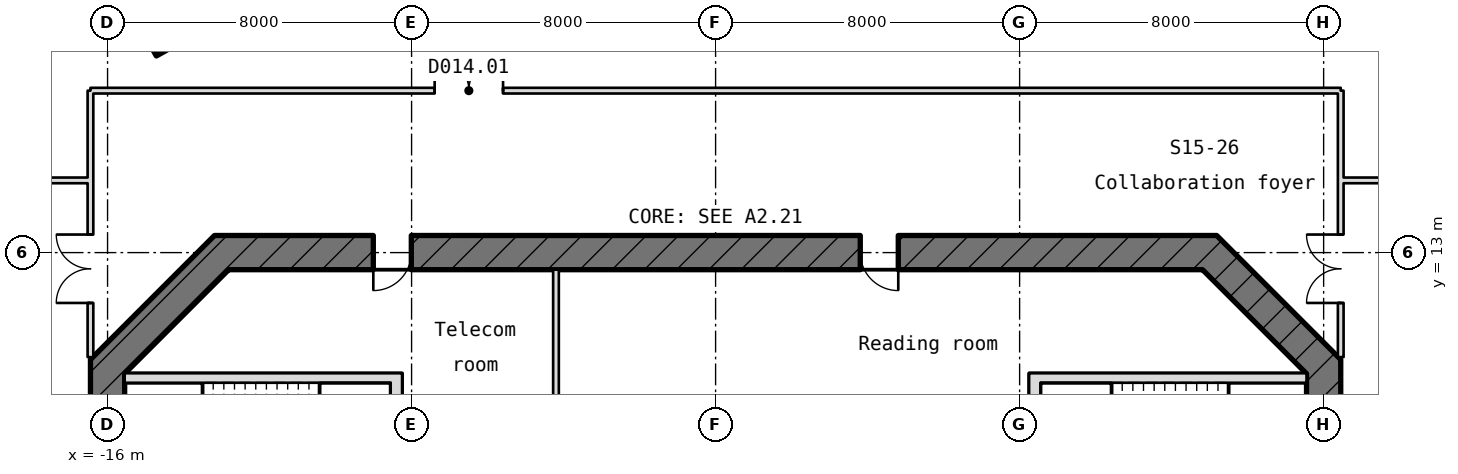
"""IFC4 building model, lengths in metres.
Left out: names, types, materials, properties, quantities, classifications, styles, units other than length and angle.
Written with IfcOpenShell. Run it as: python <this file> out.ifc"""

import sys

from ifc_helpers import new_model, si_unit, direction, frame, frame_2d, origin, origin_2d, place, context, subcontext, project, spatial, rectangle, hollow_rectangle, extrude, element, fill, save


model = new_model("IFC4")
c1 = context("Model", 3, precision=1e-05, world=origin(), true_north=direction((0.0, 1.0)))
c2 = subcontext(c1, "Body", "Model", "MODEL_VIEW")
j1 = project(units=[si_unit("LENGTHUNIT", "METRE"), si_unit("PLANEANGLEUNIT", "RADIAN")], contexts=[c1])
p1 = place(None, origin())
s1 = spatial("IfcSite", under=j1, at=p1, CompositionType="ELEMENT")
p2 = place(p1, origin())
s2 = spatial("IfcBuilding", under=s1, at=p2, CompositionType="ELEMENT")
p3 = place(p2, frame((0.0, 0.0, 223.3)))
s3 = spatial("IfcBuildingStorey", under=s2, at=p3, CompositionType="ELEMENT", Elevation=223.3)
for number, where, z_axis, x_axis in (
    (1, (17.971, 19.509, -0.18), (0.0, 0.0, 1.0), (0.874, -0.485, 0.0)),
    (2, (-14.372, 19.509, -0.18), (0.0, 0.0, 1.0), (0.874, 0.485, 0.0)),
):
    element("IfcColumn", number, at=place(p3, frame(where, z_axis=z_axis, x_axis=x_axis)), inside=s3, PredefinedType="COLUMN", context=c2, shape_type="SweptSolid", body=[
        extrude(hollow_rectangle(XDim=1.9, YDim=2.0, WallThickness=0.07, at=origin_2d()), origin(), (0.0, 0.0, 1.0), 4.15),
    ])
p4 = place(p3, frame((-15.249, 20.823, 0.0), z_axis=(0.0, 0.0, 1.0), x_axis=(-0.765870158107, -0.642995257308, 0.0)))
e3 = element("IfcWall", 3, at=p4, inside=s3, PredefinedType="SOLIDWALL", context=c2, shape_type="SweptSolid", body=[
    extrude(rectangle(XDim=11.055, YDim=0.3, at=frame_2d((5.528, 0.0))), origin(), (0.0, 0.0, 1.0), 3.97),
])
p5 = place(p4, frame((7.355, 0.0, 0.0)))
e4 = element("IfcOpeningElement", 4, at=p5, cuts=e3, PredefinedType="OPENING", context=c2, shape_type="SweptSolid", body=[
    extrude(rectangle(XDim=1.8, YDim=2.4, at=frame_2d((0.9, 1.2))), frame((0.0, 0.16, 0.0), z_axis=(0.0, -1.0, 0.0), x_axis=(1.0, 0.0, 0.0)), (0.0, 0.0, 1.0), 0.32),
])
p6 = place(p4, frame((4.755, 0.0, 0.9)))
e5 = element("IfcOpeningElement", 5, at=p6, cuts=e3, PredefinedType="OPENING", context=c2, shape_type="SweptSolid", body=[
    extrude(rectangle(XDim=2.0, YDim=1.5, at=frame_2d((1.0, 0.75))), frame((0.0, 0.16, 0.0), z_axis=(0.0, -1.0, 0.0), x_axis=(1.0, 0.0, 0.0)), (0.0, 0.0, 1.0), 0.32),
])
p7 = place(p3, frame((16.0, -10.186, -0.18), z_axis=(0.0, 0.0, 1.0), x_axis=(0.0, 1.0, 0.0)))
e6 = element("IfcWall", 6, at=p7, inside=s3, PredefinedType="SHEAR", context=c2, shape_type="SweptSolid", body=[
    extrude(rectangle(XDim=20.373, YDim=0.9, at=frame_2d((10.186, 0.0))), origin(), (0.0, 0.0, 1.0), 4.15),
])
p8 = place(p7, frame((8.986, 0.0, 0.18)))
e7 = element("IfcOpeningElement", 7, at=p8, cuts=e6, PredefinedType="OPENING", context=c2, shape_type="SweptSolid", body=[
    extrude(rectangle(XDim=2.4, YDim=2.1, at=frame_2d((1.2, 1.05))), frame((0.0, 0.46, 0.0), z_axis=(0.0, -1.0, 0.0), x_axis=(1.0, 0.0, 0.0)), (0.0, 0.0, 1.0), 0.92),
])
p9 = place(p7, frame((13.586, 0.0, 0.18)))
e8 = element("IfcOpeningElement", 8, at=p9, cuts=e6, PredefinedType="OPENING", context=c2, shape_type="SweptSolid", body=[
    extrude(rectangle(XDim=1.2, YDim=2.1, at=frame_2d((0.6, 1.05))), frame((0.0, 0.46, 0.0), z_axis=(0.0, -1.0, 0.0), x_axis=(1.0, 0.0, 0.0)), (0.0, 0.0, 1.0), 0.92),
])
p10 = place(p7, frame((2.4, 0.0, 0.18)))
e9 = element("IfcOpeningElement", 9, at=p10, cuts=e6, PredefinedType="OPENING", context=c2, shape_type="SweptSolid", body=[
    extrude(rectangle(XDim=1.2, YDim=2.1, at=frame_2d((0.6, 1.05))), frame((0.0, 0.46, 0.0), z_axis=(0.0, -1.0, 0.0), x_axis=(1.0, 0.0, 0.0)), (0.0, 0.0, 1.0), 0.92),
])
p11 = place(p3, frame((16.132, 9.868, -0.18), z_axis=(0.0, 0.0, 1.0), x_axis=(-0.707106781187, 0.707106781187, 0.0)))
e10 = element("IfcWall", 10, at=p11, inside=s3, PredefinedType="SHEAR", context=c2, shape_type="SweptSolid", body=[
    extrude(rectangle(XDim=4.615, YDim=0.9, at=frame_2d((2.308, 0.0))), origin(), (0.0, 0.0, 1.0), 4.15),
])
p12 = place(p3, frame((13.186, 13.0, -0.18), z_axis=(0.0, 0.0, 1.0), x_axis=(-1.0, 0.0, 0.0)))
e11 = element("IfcWall", 11, at=p12, inside=s3, PredefinedType="SHEAR", context=c2, shape_type="SweptSolid", body=[
    extrude(rectangle(XDim=26.373, YDim=0.9, at=frame_2d((13.186, 0.0))), origin(), (0.0, 0.0, 1.0), 4.15),
])
p13 = place(p12, frame((21.193, 0.0, 0.18)))
e12 = element("IfcOpeningElement", 12, at=p13, cuts=e11, PredefinedType="OPENING", context=c2, shape_type="SweptSolid", body=[
    extrude(rectangle(XDim=1.0, YDim=2.1, at=frame_2d((0.5, 1.05))), frame((0.0, 0.46, 0.0), z_axis=(0.0, -1.0, 0.0), x_axis=(1.0, 0.0, 0.0)), (0.0, 0.0, 1.0), 0.92),
])
p14 = place(p12, frame((8.379, 0.0, 0.18)))
e13 = element("IfcOpeningElement", 13, at=p14, cuts=e11, PredefinedType="OPENING", context=c2, shape_type="SweptSolid", body=[
    extrude(rectangle(XDim=1.0, YDim=2.1, at=frame_2d((0.5, 1.05))), frame((0.0, 0.46, 0.0), z_axis=(0.0, -1.0, 0.0), x_axis=(1.0, 0.0, 0.0)), (0.0, 0.0, 1.0), 0.92),
])
p15 = place(p3, frame((-12.868, 13.132, -0.18), z_axis=(0.0, 0.0, 1.0), x_axis=(-0.707106781187, -0.707106781187, 0.0)))
e14 = element("IfcWall", 14, at=p15, inside=s3, PredefinedType="SHEAR", context=c2, shape_type="SweptSolid", body=[
    extrude(rectangle(XDim=4.615, YDim=0.9, at=frame_2d((2.308, 0.0))), origin(), (0.0, 0.0, 1.0), 4.15),
])
p16 = place(p3, frame((-16.0, 10.186, -0.18), z_axis=(0.0, 0.0, 1.0), x_axis=(0.0, -1.0, 0.0)))
e15 = element("IfcWall", 15, at=p16, inside=s3, PredefinedType="SHEAR", context=c2, shape_type="SweptSolid", body=[
    extrude(rectangle(XDim=20.373, YDim=0.9, at=frame_2d((10.186, 0.0))), origin(), (0.0, 0.0, 1.0), 4.15),
])
p17 = place(p16, frame((8.986, 0.0, 0.18)))
e16 = element("IfcOpeningElement", 16, at=p17, cuts=e15, PredefinedType="OPENING", context=c2, shape_type="SweptSolid", body=[
    extrude(rectangle(XDim=2.4, YDim=2.1, at=frame_2d((1.2, 1.05))), frame((0.0, 0.46, 0.0), z_axis=(0.0, -1.0, 0.0), x_axis=(1.0, 0.0, 0.0)), (0.0, 0.0, 1.0), 0.92),
])
p18 = place(p16, frame((5.586, 0.0, 0.18)))
e17 = element("IfcOpeningElement", 17, at=p18, cuts=e15, PredefinedType="OPENING", context=c2, shape_type="SweptSolid", body=[
    extrude(rectangle(XDim=1.2, YDim=2.1, at=frame_2d((0.6, 1.05))), frame((0.0, 0.46, 0.0), z_axis=(0.0, -1.0, 0.0), x_axis=(1.0, 0.0, 0.0)), (0.0, 0.0, 1.0), 0.92),
])
for number, where, z_axis, x_axis in (
    (18, (-15.55, 9.7, -0.18), (0.0, 0.0, 1.0), (1.0, 0.0, 0.0)),
    (19, (8.55, 9.7, -0.18), (0.0, 0.0, 1.0), (1.0, 0.0, 0.0)),
):
    element("IfcWall", number, at=place(p3, frame(where, z_axis=z_axis, x_axis=x_axis)), inside=s3, PredefinedType="SHEAR", context=c2, shape_type="SweptSolid", body=[
        extrude(rectangle(XDim=7.0, YDim=0.25, at=frame_2d((3.5, 0.0))), origin(), (0.0, 0.0, 1.0), 4.15),
    ])
p19 = place(p3, frame((-8.4, 8.35, -0.18), z_axis=(0.0, 0.0, 1.0), x_axis=(0.0, 1.0, 0.0)))
e20 = element("IfcWall", 20, at=p19, inside=s3, PredefinedType="SHEAR", context=c2, shape_type="SweptSolid", body=[
    extrude(rectangle(XDim=1.475, YDim=0.3, at=frame_2d((0.737, 0.0))), origin(), (0.0, 0.0, 1.0), 4.15),
])
p20 = place(p3, frame((-4.2, 8.46, 0.0), z_axis=(0.0, 0.0, 1.0), x_axis=(0.0, 1.0, 0.0)))
e21 = element("IfcWall", 21, at=p20, inside=s3, PredefinedType="PARTITIONING", context=c2, shape_type="SweptSolid", body=[
    extrude(rectangle(XDim=4.09, YDim=0.15, at=frame_2d((2.045, 0.0))), origin(), (0.0, 0.0, 1.0), 3.97),
])
p21 = place(p3, frame((8.4, 8.35, -0.18), z_axis=(0.0, 0.0, 1.0), x_axis=(0.0, 1.0, 0.0)))
e22 = element("IfcWall", 22, at=p21, inside=s3, PredefinedType="SHEAR", context=c2, shape_type="SweptSolid", body=[
    extrude(rectangle(XDim=1.475, YDim=0.3, at=frame_2d((0.737, 0.0))), origin(), (0.0, 0.0, 1.0), 4.15),
])
p22 = place(p3, frame((-19.15, 14.9, 0.0), z_axis=(0.0, 0.0, 1.0), x_axis=(1.0, 0.0, 0.0)))
e23 = element("IfcWall", 23, at=p22, inside=s3, PredefinedType="PARTITIONING", context=c2, shape_type="SweptSolid", body=[
    extrude(rectangle(XDim=2.7, YDim=0.15, at=frame_2d((1.35, 0.0))), origin(), (0.0, 0.0, 1.0), 3.97),
])
p23 = place(p3, frame((-16.45, 10.25, 0.0), z_axis=(0.0, 0.0, 1.0), x_axis=(0.0, 1.0, 0.0)))
e24 = element("IfcWall", 24, at=p23, inside=s3, PredefinedType="PARTITIONING", context=c2, shape_type="SweptSolid", body=[
    extrude(rectangle(XDim=7.011, YDim=0.15, at=frame_2d((3.505, 0.0))), origin(), (0.0, 0.0, 1.0), 3.97),
])
p24 = place(p23, frame((1.425, 0.0, 0.0)))
e25 = element("IfcOpeningElement", 25, at=p24, cuts=e24, PredefinedType="OPENING", context=c2, shape_type="SweptSolid", body=[
    extrude(rectangle(XDim=1.8, YDim=2.1, at=frame_2d((0.9, 1.05))), frame((0.0, 0.085, 0.0), z_axis=(0.0, -1.0, 0.0), x_axis=(1.0, 0.0, 0.0)), (0.0, 0.0, 1.0), 0.17),
])
p25 = place(p3, frame((-16.45, 17.261, 0.0), z_axis=(0.0, 0.0, 1.0), x_axis=(1.0, 0.0, 0.0)))
e26 = element("IfcWall", 26, at=p25, inside=s3, PredefinedType="PARTITIONING", context=c2, shape_type="SweptSolid", body=[
    extrude(rectangle(XDim=32.9, YDim=0.15, at=frame_2d((16.45, 0.0))), origin(), (0.0, 0.0, 1.0), 3.97),
])
p26 = place(p25, frame((9.057, 0.0, 0.0)))
e27 = element("IfcOpeningElement", 27, at=p26, cuts=e26, PredefinedType="OPENING", context=c2, shape_type="SweptSolid", body=[
    extrude(rectangle(XDim=1.8, YDim=2.1, at=frame_2d((0.9, 1.05))), frame((0.0, 0.085, 0.0), z_axis=(0.0, -1.0, 0.0), x_axis=(1.0, 0.0, 0.0)), (0.0, 0.0, 1.0), 0.17),
])
p27 = place(p3, frame((16.45, 10.25, 0.0), z_axis=(0.0, 0.0, 1.0), x_axis=(0.0, 1.0, 0.0)))
e28 = element("IfcWall", 28, at=p27, inside=s3, PredefinedType="PARTITIONING", context=c2, shape_type="SweptSolid", body=[
    extrude(rectangle(XDim=7.011, YDim=0.15, at=frame_2d((3.505, 0.0))), origin(), (0.0, 0.0, 1.0), 3.97),
])
p28 = place(p27, frame((1.425, 0.0, 0.0)))
e29 = element("IfcOpeningElement", 29, at=p28, cuts=e28, PredefinedType="OPENING", context=c2, shape_type="SweptSolid", body=[
    extrude(rectangle(XDim=1.8, YDim=2.1, at=frame_2d((0.9, 1.05))), frame((0.0, 0.085, 0.0), z_axis=(0.0, -1.0, 0.0), x_axis=(1.0, 0.0, 0.0)), (0.0, 0.0, 1.0), 0.17),
])
p29 = place(p3, frame((16.45, 14.9, 0.0), z_axis=(0.0, 0.0, 1.0), x_axis=(1.0, 0.0, 0.0)))
e30 = element("IfcWall", 30, at=p29, inside=s3, PredefinedType="PARTITIONING", context=c2, shape_type="SweptSolid", body=[
    extrude(rectangle(XDim=2.7, YDim=0.15, at=frame_2d((1.35, 0.0))), origin(), (0.0, 0.0, 1.0), 3.97),
])
p30 = place(p13, origin())
e31 = element("IfcDoor", 31, at=p30, inside=s3, OperationType="SINGLE_SWING_RIGHT", PredefinedType="DOOR", context=c2, shape_type="SweptSolid", body=[
    extrude(rectangle(XDim=1.0, YDim=2.1, at=frame_2d((0.5, 1.05))), frame((0.0, 0.025, 0.0), z_axis=(0.0, -1.0, 0.0), x_axis=(1.0, 0.0, 0.0)), (0.0, 0.0, 1.0), 0.05),
])
fill(e12, e31)
p31 = place(p14, origin())
e32 = element("IfcDoor", 32, at=p31, inside=s3, OperationType="SINGLE_SWING_RIGHT", PredefinedType="DOOR", context=c2, shape_type="SweptSolid", body=[
    extrude(rectangle(XDim=1.0, YDim=2.1, at=frame_2d((0.5, 1.05))), frame((0.0, 0.025, 0.0), z_axis=(0.0, -1.0, 0.0), x_axis=(1.0, 0.0, 0.0)), (0.0, 0.0, 1.0), 0.05),
])
fill(e13, e32)
p32 = place(p26, origin())
e33 = element("IfcDoor", 33, at=p32, inside=s3, OperationType="DOUBLE_DOOR_SINGLE_SWING", PredefinedType="DOOR", context=c2, shape_type="SweptSolid", body=[
    extrude(rectangle(XDim=1.8, YDim=2.1, at=frame_2d((0.9, 1.05))), frame((0.0, 0.025, 0.0), z_axis=(0.0, -1.0, 0.0), x_axis=(1.0, 0.0, 0.0)), (0.0, 0.0, 1.0), 0.05),
])
fill(e27, e33)
p33 = place(p24, origin())
e34 = element("IfcDoor", 34, at=p33, inside=s3, OperationType="DOUBLE_DOOR_SINGLE_SWING", PredefinedType="DOOR", context=c2, shape_type="SweptSolid", body=[
    extrude(rectangle(XDim=1.8, YDim=2.1, at=frame_2d((0.9, 1.05))), frame((0.0, 0.025, 0.0), z_axis=(0.0, -1.0, 0.0), x_axis=(1.0, 0.0, 0.0)), (0.0, 0.0, 1.0), 0.05),
])
fill(e25, e34)
p34 = place(p28, origin())
e35 = element("IfcDoor", 35, at=p34, inside=s3, OperationType="DOUBLE_DOOR_SINGLE_SWING", PredefinedType="DOOR", context=c2, shape_type="SweptSolid", body=[
    extrude(rectangle(XDim=1.8, YDim=2.1, at=frame_2d((0.9, 1.05))), frame((0.0, 0.025, 0.0), z_axis=(0.0, -1.0, 0.0), x_axis=(1.0, 0.0, 0.0)), (0.0, 0.0, 1.0), 0.05),
])
fill(e29, e35)
save(model, sys.argv[1])
